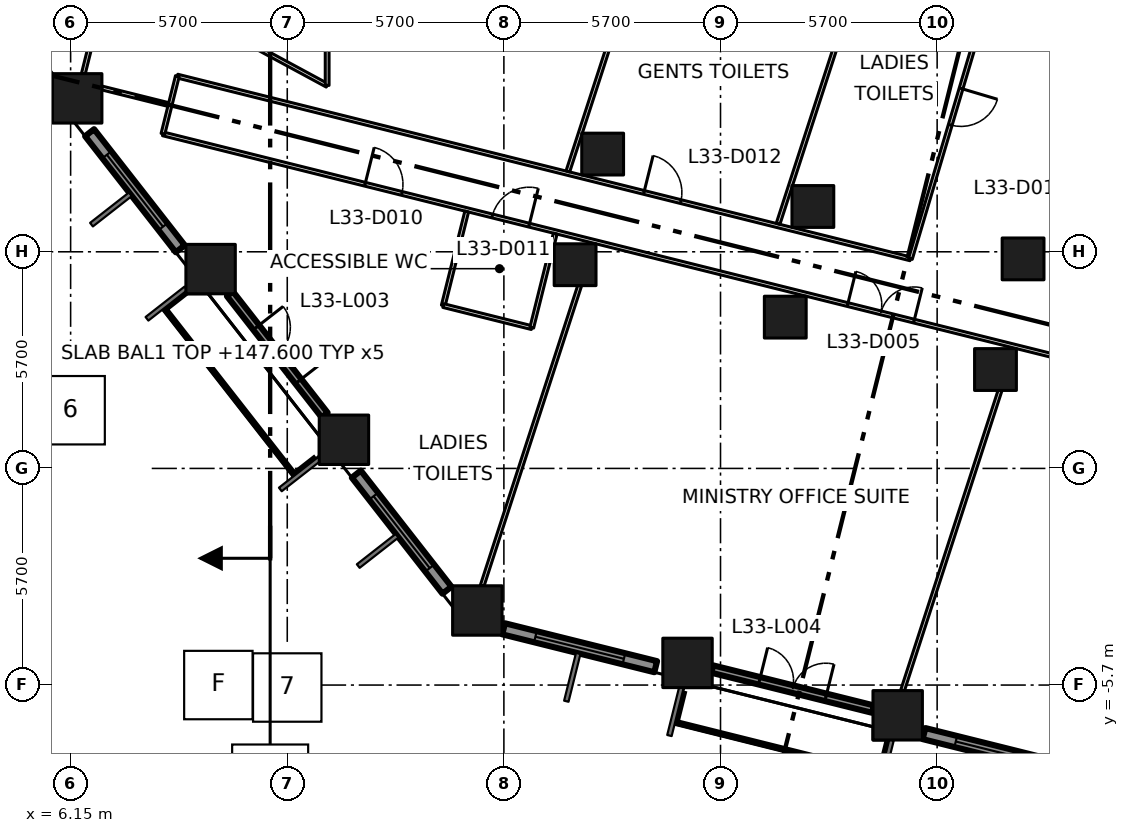
"""IFC4 building model, lengths in metres.
Left out: names, types, materials, properties, quantities, classifications, styles, units other than length and angle.
Written with IfcOpenShell. Run it as: python <this file> out.ifc"""

import sys

from ifc_helpers import new_model, si_unit, direction, frame, frame_2d, origin, origin_2d, place, context, subcontext, project, spatial, rectangle, extrude, element, fill, save


model = new_model("IFC4")
c1 = context("Model", 3, precision=1e-05, world=origin(), true_north=direction((0.0, 1.0)))
c2 = subcontext(c1, "Body", "Model", "MODEL_VIEW")
j1 = project(units=[si_unit("LENGTHUNIT", "METRE"), si_unit("PLANEANGLEUNIT", "RADIAN")], contexts=[c1])
p1 = place(None, origin())
s1 = spatial("IfcSite", under=j1, at=p1, CompositionType="ELEMENT")
p2 = place(p1, origin())
s2 = spatial("IfcBuilding", under=s1, at=p2, CompositionType="ELEMENT")
p3 = place(p2, frame((0.0, 0.0, 147.6)))
s3 = spatial("IfcBuildingStorey", under=s2, at=p3, CompositionType="ELEMENT", Elevation=147.6)
for number, where, z_axis, x_axis in (
    (1, (16.851, -3.738, 0.0), (0.0, 0.0, 1.0), (1.0, 0.0, 0.0)),
    (2, (13.342, 0.754, 0.0), (0.0, 0.0, 1.0), (1.0, 0.0, 0.0)),
    (3, (9.833, 5.245, 0.0), (0.0, 0.0, 1.0), (1.0, 0.0, 0.0)),
    (4, (6.323, 9.737, 0.0), (0.0, 0.0, 1.0), (1.0, 0.0, 0.0)),
    (5, (22.382, -5.117, 0.0), (0.0, 0.0, 1.0), (1.0, 0.0, 0.0)),
    (6, (27.912, -6.496, 0.0), (0.0, 0.0, 1.0), (1.0, 0.0, 0.0)),
):
    element("IfcColumn", number, at=place(p3, frame(where, z_axis=z_axis, x_axis=x_axis)), inside=s3, PredefinedType="COLUMN", context=c2, shape_type="SweptSolid", body=[
        extrude(rectangle(XDim=1.3, YDim=1.3, at=origin_2d()), origin(), (0.0, 0.0, 1.0), 4.2),
    ])
for number, where, z_axis, x_axis in (
    (7, (19.424, 5.36, 0.0), (0.0, 0.0, 1.0), (1.0, 0.0, 0.0)),
    (8, (24.954, 3.981, 0.0), (0.0, 0.0, 1.0), (1.0, 0.0, 0.0)),
    (9, (30.485, 2.602, 0.0), (0.0, 0.0, 1.0), (1.0, 0.0, 0.0)),
    (10, (20.149, 8.271, 0.0), (0.0, 0.0, 1.0), (1.0, 0.0, 0.0)),
    (11, (25.68, 6.892, 0.0), (0.0, 0.0, 1.0), (1.0, 0.0, 0.0)),
    (12, (31.211, 5.513, 0.0), (0.0, 0.0, 1.0), (1.0, 0.0, 0.0)),
):
    element("IfcColumn", number, at=place(p3, frame(where, z_axis=z_axis, x_axis=x_axis)), inside=s3, PredefinedType="COLUMN", context=c2, shape_type="SweptSolid", body=[
        extrude(rectangle(XDim=1.1, YDim=1.1, at=origin_2d()), origin(), (0.0, 0.0, 1.0), 4.2),
    ])
p4 = place(p3, frame((6.649, 8.834, 0.0), z_axis=(0.0, 0.0, 1.0), x_axis=(0.615535257281, -0.788109349674, 0.0)))
e13 = element("IfcWall", 13, at=p4, inside=s3, PredefinedType="SOLIDWALL", context=c2, shape_type="SweptSolid", body=[
    extrude(rectangle(XDim=3.876, YDim=0.3, at=frame_2d((1.938, 0.0))), origin(), (0.0, 0.0, 1.0), 3.1),
])
p5 = place(p4, frame((0.738, 0.0, 0.8)))
e14 = element("IfcOpeningElement", 14, at=p5, cuts=e13, PredefinedType="OPENING", context=c2, shape_type="SweptSolid", body=[
    extrude(rectangle(XDim=2.4, YDim=2.1, at=frame_2d((1.2, 1.05))), frame((0.0, 0.16, 0.0), z_axis=(0.0, -1.0, 0.0), x_axis=(1.0, 0.0, 0.0)), (0.0, 0.0, 1.0), 0.32),
])
p6 = place(p3, frame((10.341, 4.595, 0.0), z_axis=(0.0, 0.0, 1.0), x_axis=(0.615646382005, -0.788022545569, 0.0)))
e15 = element("IfcWall", 15, at=p6, inside=s3, PredefinedType="SOLIDWALL", context=c2, shape_type="SweptSolid", body=[
    extrude(rectangle(XDim=4.049, YDim=0.2, at=frame_2d((2.025, 0.0))), origin(), (0.0, 0.0, 1.0), 3.1),
])
p7 = place(p6, frame((1.124, 0.0, 0.0)))
e16 = element("IfcOpeningElement", 16, at=p7, cuts=e15, PredefinedType="OPENING", context=c2, shape_type="SweptSolid", body=[
    extrude(rectangle(XDim=1.8, YDim=2.9, at=frame_2d((0.9, 1.45))), frame((0.0, 0.11, 0.0), z_axis=(0.0, -1.0, 0.0), x_axis=(1.0, 0.0, 0.0)), (0.0, 0.0, 1.0), 0.22),
])
p8 = place(p3, frame((8.89, 4.292, 0.0), z_axis=(0.0, 0.0, 1.0), x_axis=(0.615636085037, -0.788030590016, 0.0)))
e17 = element("IfcWall", 17, at=p8, inside=s3, PredefinedType="SOLIDWALL", context=c2, shape_type="SweptSolid", body=[
    extrude(rectangle(XDim=5.359, YDim=0.4, at=frame_2d((2.679, 0.0))), origin(), (0.0, 0.0, 1.0), 0.3),
])
p9 = place(p3, frame((13.667, -0.15, 0.0), z_axis=(0.0, 0.0, 1.0), x_axis=(0.615626928003, -0.788037743714, 0.0)))
e18 = element("IfcWall", 18, at=p9, inside=s3, PredefinedType="SOLIDWALL", context=c2, shape_type="SweptSolid", body=[
    extrude(rectangle(XDim=3.876, YDim=0.3, at=frame_2d((1.938, 0.0))), origin(), (0.0, 0.0, 1.0), 3.1),
])
p10 = place(p9, frame((0.738, 0.0, 0.8)))
e19 = element("IfcOpeningElement", 19, at=p10, cuts=e18, PredefinedType="OPENING", context=c2, shape_type="SweptSolid", body=[
    extrude(rectangle(XDim=2.4, YDim=2.1, at=frame_2d((1.2, 1.05))), frame((0.0, 0.16, 0.0), z_axis=(0.0, -1.0, 0.0), x_axis=(1.0, 0.0, 0.0)), (0.0, 0.0, 1.0), 0.32),
])
p11 = place(p3, frame((17.543, -4.22, 0.0), z_axis=(0.0, 0.0, 1.0), x_axis=(0.970337184445, -0.241755555227, 0.0)))
e20 = element("IfcWall", 20, at=p11, inside=s3, PredefinedType="SOLIDWALL", context=c2, shape_type="SweptSolid", body=[
    extrude(rectangle(XDim=4.124, YDim=0.3, at=frame_2d((2.062, 0.0))), origin(), (0.0, 0.0, 1.0), 3.1),
])
p12 = place(p11, frame((0.862, 0.0, 0.8)))
e21 = element("IfcOpeningElement", 21, at=p12, cuts=e20, PredefinedType="OPENING", context=c2, shape_type="SweptSolid", body=[
    extrude(rectangle(XDim=2.4, YDim=2.1, at=frame_2d((1.2, 1.05))), frame((0.0, 0.16, 0.0), z_axis=(0.0, -1.0, 0.0), x_axis=(1.0, 0.0, 0.0)), (0.0, 0.0, 1.0), 0.32),
])
p13 = place(p3, frame((23.032, -5.279, 0.0), z_axis=(0.0, 0.0, 1.0), x_axis=(0.970333273122, -0.241771253611, 0.0)))
e22 = element("IfcWall", 22, at=p13, inside=s3, PredefinedType="SOLIDWALL", context=c2, shape_type="SweptSolid", body=[
    extrude(rectangle(XDim=4.359, YDim=0.2, at=frame_2d((2.18, 0.0))), origin(), (0.0, 0.0, 1.0), 3.1),
])
p14 = place(p13, frame((1.279, 0.0, 0.0)))
e23 = element("IfcOpeningElement", 23, at=p14, cuts=e22, PredefinedType="OPENING", context=c2, shape_type="SweptSolid", body=[
    extrude(rectangle(XDim=1.8, YDim=2.9, at=frame_2d((0.9, 1.45))), frame((0.0, 0.11, 0.0), z_axis=(0.0, -1.0, 0.0), x_axis=(1.0, 0.0, 0.0)), (0.0, 0.0, 1.0), 0.22),
])
p15 = place(p3, frame((22.225, -6.448, 0.0), z_axis=(0.0, 0.0, 1.0), x_axis=(0.970268314528, -0.242031811592, 0.0)))
e24 = element("IfcWall", 24, at=p15, inside=s3, PredefinedType="SOLIDWALL", context=c2, shape_type="SweptSolid", body=[
    extrude(rectangle(XDim=5.359, YDim=0.4, at=frame_2d((2.68, 0.0))), origin(), (0.0, 0.0, 1.0), 0.3),
])
p16 = place(p3, frame((28.604, -6.977, 0.0), z_axis=(0.0, 0.0, 1.0), x_axis=(0.970281616392, -0.241978480223, 0.0)))
e25 = element("IfcWall", 25, at=p16, inside=s3, PredefinedType="SOLIDWALL", context=c2, shape_type="SweptSolid", body=[
    extrude(rectangle(XDim=4.125, YDim=0.3, at=frame_2d((2.062, 0.0))), origin(), (0.0, 0.0, 1.0), 3.1),
])
p17 = place(p16, frame((0.862, 0.0, 0.8)))
e26 = element("IfcOpeningElement", 26, at=p17, cuts=e25, PredefinedType="OPENING", context=c2, shape_type="SweptSolid", body=[
    extrude(rectangle(XDim=2.4, YDim=2.1, at=frame_2d((1.2, 1.05))), frame((0.0, 0.16, 0.0), z_axis=(0.0, -1.0, 0.0), x_axis=(1.0, 0.0, 0.0)), (0.0, 0.0, 1.0), 0.32),
])
p18 = place(p3, frame((8.579, 8.803, 0.0), z_axis=(0.0, 0.0, 1.0), x_axis=(0.970298569476, -0.241910491863, 0.0)))
e27 = element("IfcWall", 27, at=p18, inside=s3, PredefinedType="PARTITIONING", context=c2, shape_type="SweptSolid", body=[
    extrude(rectangle(XDim=62.676, YDim=0.1, at=frame_2d((31.338, 0.0))), origin(), (0.0, 0.0, 1.0), 3.9),
])
p19 = place(p18, frame((36.566, 0.0, 0.0)))
e28 = element("IfcOpeningElement", 28, at=p19, cuts=e27, PredefinedType="OPENING", context=c2, shape_type="SweptSolid", body=[
    extrude(rectangle(XDim=1.8, YDim=2.1, at=frame_2d((0.9, 1.05))), frame((0.0, 0.06, 0.0), z_axis=(0.0, -1.0, 0.0), x_axis=(1.0, 0.0, 0.0)), (0.0, 0.0, 1.0), 0.12),
])
p20 = place(p18, frame((18.567, 0.0, 0.0)))
e29 = element("IfcOpeningElement", 29, at=p20, cuts=e27, PredefinedType="OPENING", context=c2, shape_type="SweptSolid", body=[
    extrude(rectangle(XDim=1.8, YDim=2.1, at=frame_2d((0.9, 1.05))), frame((0.0, 0.06, 0.0), z_axis=(0.0, -1.0, 0.0), x_axis=(1.0, 0.0, 0.0)), (0.0, 0.0, 1.0), 0.12),
])
p21 = place(p18, frame((31.966, 0.0, 0.0)))
e30 = element("IfcOpeningElement", 30, at=p21, cuts=e27, PredefinedType="OPENING", context=c2, shape_type="SweptSolid", body=[
    extrude(rectangle(XDim=1.0, YDim=2.1, at=frame_2d((0.5, 1.05))), frame((0.0, 0.06, 0.0), z_axis=(0.0, -1.0, 0.0), x_axis=(1.0, 0.0, 0.0)), (0.0, 0.0, 1.0), 0.12),
])
p22 = place(p18, frame((5.48, 0.0, 0.0)))
e31 = element("IfcOpeningElement", 31, at=p22, cuts=e27, PredefinedType="OPENING", context=c2, shape_type="SweptSolid", body=[
    extrude(rectangle(XDim=1.0, YDim=2.1, at=frame_2d((0.5, 1.05))), frame((0.0, 0.06, 0.0), z_axis=(0.0, -1.0, 0.0), x_axis=(1.0, 0.0, 0.0)), (0.0, 0.0, 1.0), 0.12),
])
p23 = place(p18, frame((8.93, 0.0, 0.0)))
e32 = element("IfcOpeningElement", 32, at=p23, cuts=e27, PredefinedType="OPENING", context=c2, shape_type="SweptSolid", body=[
    extrude(rectangle(XDim=1.0, YDim=2.1, at=frame_2d((0.5, 1.05))), frame((0.0, 0.06, 0.0), z_axis=(0.0, -1.0, 0.0), x_axis=(1.0, 0.0, 0.0)), (0.0, 0.0, 1.0), 0.12),
])
p24 = place(p3, frame((8.958, 10.323, 0.0), z_axis=(0.0, 0.0, 1.0), x_axis=(0.970298340477, -0.241911410372, 0.0)))
e33 = element("IfcWall", 33, at=p24, inside=s3, PredefinedType="PARTITIONING", context=c2, shape_type="SweptSolid", body=[
    extrude(rectangle(XDim=19.88, YDim=0.1, at=frame_2d((9.94, 0.0))), origin(), (0.0, 0.0, 1.0), 3.9),
])
p25 = place(p24, frame((12.653, 0.0, 0.0)))
e34 = element("IfcOpeningElement", 34, at=p25, cuts=e33, PredefinedType="OPENING", context=c2, shape_type="SweptSolid", body=[
    extrude(rectangle(XDim=1.0, YDim=2.1, at=frame_2d((0.5, 1.05))), frame((0.0, 0.06, 0.0), z_axis=(0.0, -1.0, 0.0), x_axis=(1.0, 0.0, 0.0)), (0.0, 0.0, 1.0), 0.12),
])
p26 = place(p3, frame((8.958, 10.323, 0.0), z_axis=(0.0, 0.0, 1.0), x_axis=(-0.241875508386, -0.97030729073, 0.0)))
e35 = element("IfcWall", 35, at=p26, inside=s3, PredefinedType="PARTITIONING", context=c2, shape_type="SweptSolid", body=[
    extrude(rectangle(XDim=1.567, YDim=0.1, at=frame_2d((0.783, 0.0))), origin(), (0.0, 0.0, 1.0), 3.9),
])
p27 = place(p3, frame((9.9, 11.7, 0.0), z_axis=(0.0, 0.0, 1.0), x_axis=(0.87965147249, -0.475618846291, 0.0)))
e36 = element("IfcWall", 36, at=p27, inside=s3, PredefinedType="PARTITIONING", context=c2, shape_type="SweptSolid", body=[
    extrude(rectangle(XDim=3.41, YDim=0.1, at=frame_2d((1.705, 0.0))), origin(), (0.0, 0.0, 1.0), 3.9),
])
p28 = place(p3, frame((12.9, 10.078, 0.0), z_axis=(0.0, 0.0, 1.0), x_axis=(0.0, 1.0, 0.0)))
e37 = element("IfcWall", 37, at=p28, inside=s3, PredefinedType="PARTITIONING", context=c2, shape_type="SweptSolid", body=[
    extrude(rectangle(XDim=4.022, YDim=0.1, at=frame_2d((2.011, 0.0))), origin(), (0.0, 0.0, 1.0), 3.9),
])
p29 = place(p28, frame((1.48, 0.0, 0.0)))
e38 = element("IfcOpeningElement", 38, at=p29, cuts=e37, PredefinedType="OPENING", context=c2, shape_type="SweptSolid", body=[
    extrude(rectangle(XDim=1.0, YDim=2.1, at=frame_2d((0.5, 1.05))), frame((0.0, 0.06, 0.0), z_axis=(0.0, -1.0, 0.0), x_axis=(1.0, 0.0, 0.0)), (0.0, 0.0, 1.0), 0.12),
])
p30 = place(p3, frame((30.8, 14.1, 0.0), z_axis=(0.0, 0.0, 1.0), x_axis=(-0.285004107837, -0.958526295162, 0.0)))
e39 = element("IfcWall", 39, at=p30, inside=s3, PredefinedType="PARTITIONING", context=c2, shape_type="SweptSolid", body=[
    extrude(rectangle(XDim=8.958, YDim=0.1, at=frame_2d((4.479, 0.0))), origin(), (0.0, 0.0, 1.0), 3.9),
])
p31 = place(p30, frame((4.28, 0.0, 0.0)))
e40 = element("IfcOpeningElement", 40, at=p31, cuts=e39, PredefinedType="OPENING", context=c2, shape_type="SweptSolid", body=[
    extrude(rectangle(XDim=1.0, YDim=2.1, at=frame_2d((0.5, 1.05))), frame((0.0, 0.06, 0.0), z_axis=(0.0, -1.0, 0.0), x_axis=(1.0, 0.0, 0.0)), (0.0, 0.0, 1.0), 0.12),
])
p32 = place(p3, frame((6.797, 11.638, 0.0), z_axis=(0.0, 0.0, 1.0), x_axis=(-0.242000927221, -0.970276018061, 0.0)))
e41 = element("IfcWall", 41, at=p32, inside=s3, PredefinedType="PARTITIONING", context=c2, shape_type="SweptSolid", body=[
    extrude(rectangle(XDim=1.289, YDim=0.1, at=frame_2d((0.645, 0.0))), origin(), (0.0, 0.0, 1.0), 3.9),
])
p33 = place(p3, frame((8.719, 9.575, 0.0), z_axis=(0.0, 0.0, 1.0), x_axis=(-0.970333736057, 0.241769395645, 0.0)))
e42 = element("IfcWall", 42, at=p33, inside=s3, PredefinedType="PARTITIONING", context=c2, shape_type="SweptSolid", body=[
    extrude(rectangle(XDim=1.8, YDim=0.1, at=frame_2d((0.9, 0.0))), origin(), (0.0, 0.0, 1.0), 3.9),
])
p34 = place(p3, frame((15.955, 4.285, 0.0), z_axis=(0.0, 0.0, 1.0), x_axis=(0.241949841323, 0.970288758197, 0.0)))
e43 = element("IfcWall", 43, at=p34, inside=s3, PredefinedType="PARTITIONING", context=c2, shape_type="SweptSolid", body=[
    extrude(rectangle(XDim=2.55, YDim=0.1, at=frame_2d((1.275, 0.0))), origin(), (0.0, 0.0, 1.0), 3.9),
])
p35 = place(p3, frame((16.978, -3.088, 0.0), z_axis=(0.0, 0.0, 1.0), x_axis=(0.308986355751, 0.951066470842, 0.0)))
e44 = element("IfcWall", 44, at=p35, inside=s3, PredefinedType="PARTITIONING", context=c2, shape_type="SweptSolid", body=[
    extrude(rectangle(XDim=8.304, YDim=0.1, at=frame_2d((4.152, 0.0))), origin(), (0.0, 0.0, 1.0), 3.9),
])
p36 = place(p3, frame((18.284, 3.704, 0.0), z_axis=(0.0, 0.0, 1.0), x_axis=(-0.970279961304, 0.241985116673, 0.0)))
e45 = element("IfcWall", 45, at=p36, inside=s3, PredefinedType="PARTITIONING", context=c2, shape_type="SweptSolid", body=[
    extrude(rectangle(XDim=2.4, YDim=0.1, at=frame_2d((1.2, 0.0))), origin(), (0.0, 0.0, 1.0), 3.9),
])
p37 = place(p3, frame((18.901, 6.178, 0.0), z_axis=(0.0, 0.0, 1.0), x_axis=(-0.241972320765, -0.970283152478, 0.0)))
e46 = element("IfcWall", 46, at=p37, inside=s3, PredefinedType="PARTITIONING", context=c2, shape_type="SweptSolid", body=[
    extrude(rectangle(XDim=2.55, YDim=0.1, at=frame_2d((1.275, 0.0))), origin(), (0.0, 0.0, 1.0), 3.9),
])
p38 = place(p3, frame((19.234, 7.816, 0.0), z_axis=(0.0, 0.0, 1.0), x_axis=(0.309035944139, 0.951050358935, 0.0)))
e47 = element("IfcWall", 47, at=p38, inside=s3, PredefinedType="PARTITIONING", context=c2, shape_type="SweptSolid", body=[
    extrude(rectangle(XDim=6.608, YDim=0.1, at=frame_2d((3.304, 0.0))), origin(), (0.0, 0.0, 1.0), 3.9),
])
p39 = place(p3, frame((24.765, 6.437, 0.0), z_axis=(0.0, 0.0, 1.0), x_axis=(0.309028520832, 0.951052771045, 0.0)))
e48 = element("IfcWall", 48, at=p39, inside=s3, PredefinedType="PARTITIONING", context=c2, shape_type="SweptSolid", body=[
    extrude(rectangle(XDim=8.057, YDim=0.1, at=frame_2d((4.029, 0.0))), origin(), (0.0, 0.0, 1.0), 3.9),
])
p40 = place(p3, frame((28.039, -5.846, 0.0), z_axis=(0.0, 0.0, 1.0), x_axis=(0.308986355751, 0.951066470842, 0.0)))
e49 = element("IfcWall", 49, at=p40, inside=s3, PredefinedType="PARTITIONING", context=c2, shape_type="SweptSolid", body=[
    extrude(rectangle(XDim=8.304, YDim=0.1, at=frame_2d((4.152, 0.0))), origin(), (0.0, 0.0, 1.0), 3.9),
])
p41 = place(p5, origin())
e50 = element("IfcWindow", 50, at=p41, inside=s3, PartitioningType="DOUBLE_PANEL_VERTICAL", PredefinedType="WINDOW", context=c2, shape_type="SweptSolid", body=[
    extrude(rectangle(XDim=2.4, YDim=2.1, at=frame_2d((1.2, 1.05))), frame((0.0, 0.03, 0.0), z_axis=(0.0, -1.0, 0.0), x_axis=(1.0, 0.0, 0.0)), (0.0, 0.0, 1.0), 0.06),
])
fill(e14, e50)
p42 = place(p7, origin())
e51 = element("IfcDoor", 51, at=p42, inside=s3, OperationType="DOUBLE_DOOR_SINGLE_SWING", PredefinedType="DOOR", context=c2, shape_type="SweptSolid", body=[
    extrude(rectangle(XDim=1.8, YDim=2.9, at=frame_2d((0.9, 1.45))), frame((0.0, 0.025, 0.0), z_axis=(0.0, -1.0, 0.0), x_axis=(1.0, 0.0, 0.0)), (0.0, 0.0, 1.0), 0.05),
])
fill(e16, e51)
p43 = place(p10, origin())
e52 = element("IfcWindow", 52, at=p43, inside=s3, PartitioningType="DOUBLE_PANEL_VERTICAL", PredefinedType="WINDOW", context=c2, shape_type="SweptSolid", body=[
    extrude(rectangle(XDim=2.4, YDim=2.1, at=frame_2d((1.2, 1.05))), frame((0.0, 0.03, 0.0), z_axis=(0.0, -1.0, 0.0), x_axis=(1.0, 0.0, 0.0)), (0.0, 0.0, 1.0), 0.06),
])
fill(e19, e52)
p44 = place(p12, origin())
e53 = element("IfcWindow", 53, at=p44, inside=s3, PartitioningType="DOUBLE_PANEL_VERTICAL", PredefinedType="WINDOW", context=c2, shape_type="SweptSolid", body=[
    extrude(rectangle(XDim=2.4, YDim=2.1, at=frame_2d((1.2, 1.05))), frame((0.0, 0.03, 0.0), z_axis=(0.0, -1.0, 0.0), x_axis=(1.0, 0.0, 0.0)), (0.0, 0.0, 1.0), 0.06),
])
fill(e21, e53)
p45 = place(p14, origin())
e54 = element("IfcDoor", 54, at=p45, inside=s3, OperationType="DOUBLE_DOOR_SINGLE_SWING", PredefinedType="DOOR", context=c2, shape_type="SweptSolid", body=[
    extrude(rectangle(XDim=1.8, YDim=2.9, at=frame_2d((0.9, 1.45))), frame((0.0, 0.025, 0.0), z_axis=(0.0, -1.0, 0.0), x_axis=(1.0, 0.0, 0.0)), (0.0, 0.0, 1.0), 0.05),
])
fill(e23, e54)
p46 = place(p17, origin())
e55 = element("IfcWindow", 55, at=p46, inside=s3, PartitioningType="DOUBLE_PANEL_VERTICAL", PredefinedType="WINDOW", context=c2, shape_type="SweptSolid", body=[
    extrude(rectangle(XDim=2.4, YDim=2.1, at=frame_2d((1.2, 1.05))), frame((0.0, 0.03, 0.0), z_axis=(0.0, -1.0, 0.0), x_axis=(1.0, 0.0, 0.0)), (0.0, 0.0, 1.0), 0.06),
])
fill(e26, e55)
p47 = place(p20, origin())
e56 = element("IfcDoor", 56, at=p47, inside=s3, OperationType="DOUBLE_DOOR_SINGLE_SWING", PredefinedType="DOOR", context=c2, shape_type="SweptSolid", body=[
    extrude(rectangle(XDim=1.8, YDim=2.1, at=frame_2d((0.9, 1.05))), frame((0.0, 0.025, 0.0), z_axis=(0.0, -1.0, 0.0), x_axis=(1.0, 0.0, 0.0)), (0.0, 0.0, 1.0), 0.05),
])
fill(e29, e56)
p48 = place(p22, origin())
e57 = element("IfcDoor", 57, at=p48, inside=s3, OperationType="SINGLE_SWING_LEFT", PredefinedType="DOOR", context=c2, shape_type="SweptSolid", body=[
    extrude(rectangle(XDim=1.0, YDim=2.1, at=frame_2d((0.5, 1.05))), frame((0.0, 0.025, 0.0), z_axis=(0.0, -1.0, 0.0), x_axis=(1.0, 0.0, 0.0)), (0.0, 0.0, 1.0), 0.05),
])
fill(e31, e57)
p49 = place(p23, origin())
e58 = element("IfcDoor", 58, at=p49, inside=s3, OperationType="SINGLE_SWING_RIGHT", PredefinedType="DOOR", context=c2, shape_type="SweptSolid", body=[
    extrude(rectangle(XDim=1.0, YDim=2.1, at=frame_2d((0.5, 1.05))), frame((0.0, 0.025, 0.0), z_axis=(0.0, -1.0, 0.0), x_axis=(1.0, 0.0, 0.0)), (0.0, 0.0, 1.0), 0.05),
])
fill(e32, e58)
p50 = place(p25, origin())
e59 = element("IfcDoor", 59, at=p50, inside=s3, OperationType="SINGLE_SWING_LEFT", PredefinedType="DOOR", context=c2, shape_type="SweptSolid", body=[
    extrude(rectangle(XDim=1.0, YDim=2.1, at=frame_2d((0.5, 1.05))), frame((0.0, 0.025, 0.0), z_axis=(0.0, -1.0, 0.0), x_axis=(1.0, 0.0, 0.0)), (0.0, 0.0, 1.0), 0.05),
])
fill(e34, e59)
p51 = place(p31, origin())
e60 = element("IfcDoor", 60, at=p51, inside=s3, OperationType="SINGLE_SWING_LEFT", PredefinedType="DOOR", context=c2, shape_type="SweptSolid", body=[
    extrude(rectangle(XDim=1.0, YDim=2.1, at=frame_2d((0.5, 1.05))), frame((0.0, 0.025, 0.0), z_axis=(0.0, -1.0, 0.0), x_axis=(1.0, 0.0, 0.0)), (0.0, 0.0, 1.0), 0.05),
])
fill(e40, e60)
save(model, sys.argv[1])
